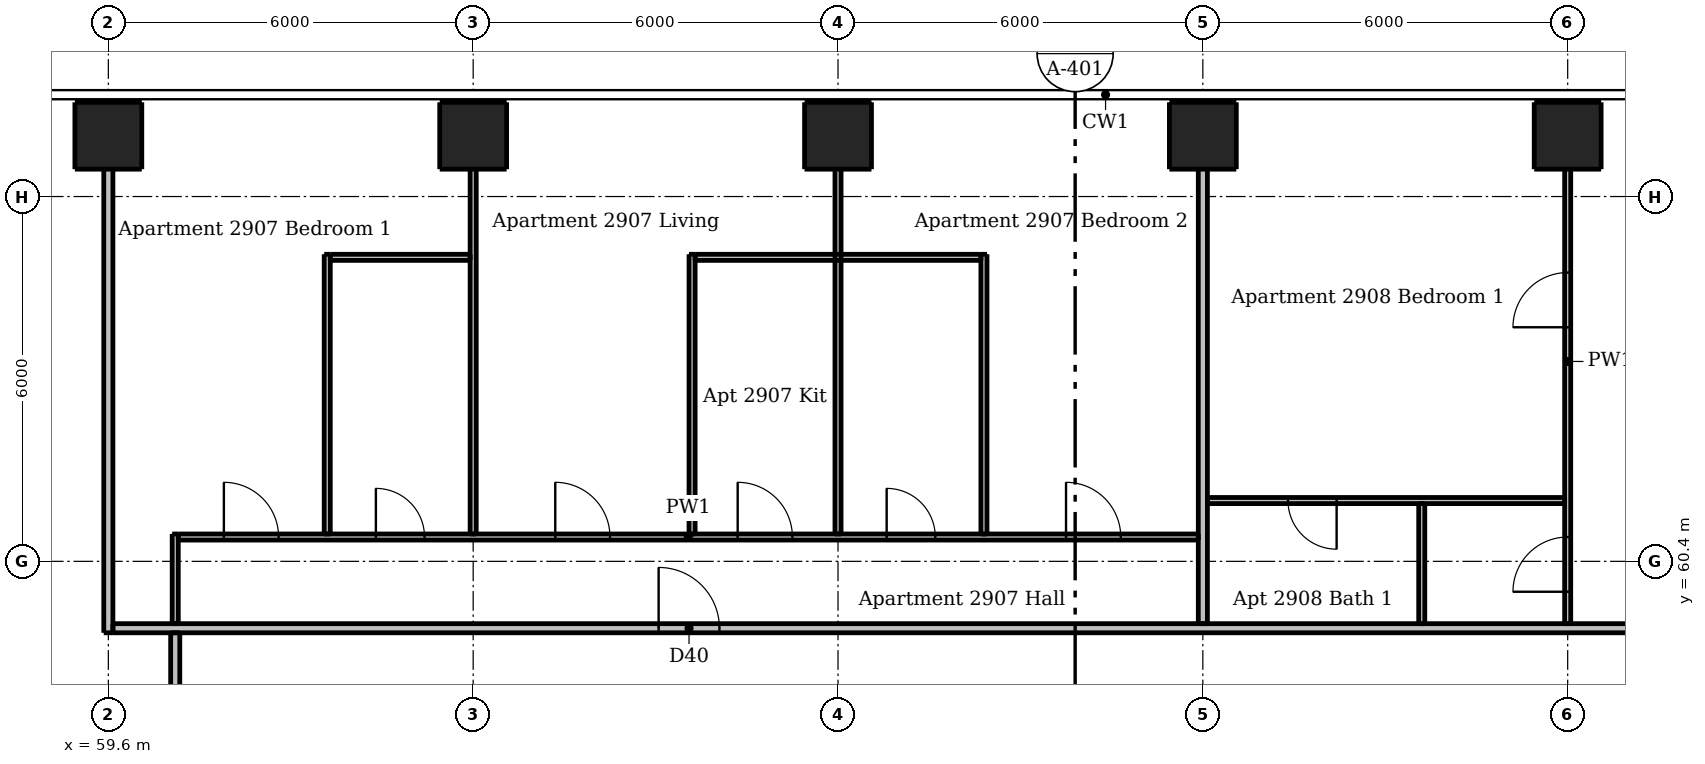
"""IFC4 building model, lengths in metres.
Left out: names, types, materials, properties, quantities, classifications, styles, units other than length and angle.
Written with IfcOpenShell. Run it as: python <this file> out.ifc"""

import sys

from ifc_helpers import new_model, si_unit, direction, frame, frame_2d, origin, origin_2d, place, context, subcontext, project, spatial, rectangle, extrude, element, fill, save


model = new_model("IFC4")
c1 = context("Model", 3, precision=1e-05, world=origin(), true_north=direction((0.0, 1.0)))
c2 = subcontext(c1, "Body", "Model", "MODEL_VIEW")
j1 = project(units=[si_unit("LENGTHUNIT", "METRE"), si_unit("PLANEANGLEUNIT", "RADIAN")], contexts=[c1])
p1 = place(None, origin())
s1 = spatial("IfcSite", under=j1, at=p1, CompositionType="ELEMENT")
p2 = place(p1, origin())
s2 = spatial("IfcBuilding", under=s1, at=p2, CompositionType="ELEMENT")
p3 = place(p2, frame((0.0, 0.0, 108.4)))
s3 = spatial("IfcBuildingStorey", under=s2, at=p3, CompositionType="ELEMENT", Elevation=108.4)
for number, where, z_axis, x_axis in (
    (1, (59.6, 67.4, 0.0), (0.0, 0.0, 1.0), (1.0, 0.0, 0.0)),
    (2, (65.6, 67.4, 0.0), (0.0, 0.0, 1.0), (1.0, 0.0, 0.0)),
    (3, (71.6, 67.4, 0.0), (0.0, 0.0, 1.0), (1.0, 0.0, 0.0)),
    (4, (77.6, 67.4, 0.0), (0.0, 0.0, 1.0), (1.0, 0.0, 0.0)),
    (5, (83.6, 67.4, 0.0), (0.0, 0.0, 1.0), (1.0, 0.0, 0.0)),
):
    element("IfcColumn", number, at=place(p3, frame(where, z_axis=z_axis, x_axis=x_axis)), inside=s3, PredefinedType="COLUMN", context=c2, shape_type="SweptSolid", body=[
        extrude(rectangle(XDim=1.1, YDim=1.1, at=origin_2d()), origin(), (0.0, 0.0, 1.0), 3.05),
    ])
p4 = place(p3, frame((60.7, 59.375, 0.0), z_axis=(0.0, 0.0, 1.0), x_axis=(0.0, 1.0, 0.0)))
e6 = element("IfcWall", 6, at=p4, inside=s3, PredefinedType="PARTITIONING", context=c2, shape_type="SweptSolid", body=[
    extrude(rectangle(XDim=1.475, YDim=0.1, at=frame_2d((0.738, 0.0))), origin(), (0.0, 0.0, 1.0), 3.05),
])
p5 = place(p3, frame((63.2, 60.85, 0.0), z_axis=(0.0, 0.0, 1.0), x_axis=(0.0, 1.0, 0.0)))
e7 = element("IfcWall", 7, at=p5, inside=s3, PredefinedType="PARTITIONING", context=c2, shape_type="SweptSolid", body=[
    extrude(rectangle(XDim=4.6, YDim=0.1, at=frame_2d((2.3, 0.0))), origin(), (0.0, 0.0, 1.0), 3.05),
])
p6 = place(p3, frame((65.6, 60.85, 0.0), z_axis=(0.0, 0.0, 1.0), x_axis=(0.0, 1.0, 0.0)))
e8 = element("IfcWall", 8, at=p6, inside=s3, PredefinedType="PARTITIONING", context=c2, shape_type="SweptSolid", body=[
    extrude(rectangle(XDim=7.15, YDim=0.1, at=frame_2d((3.575, 0.0))), origin(), (0.0, 0.0, 1.0), 2.516),
])
p7 = place(p3, frame((69.2, 60.85, 0.0), z_axis=(0.0, 0.0, 1.0), x_axis=(0.0, 1.0, 0.0)))
e9 = element("IfcWall", 9, at=p7, inside=s3, PredefinedType="PARTITIONING", context=c2, shape_type="SweptSolid", body=[
    extrude(rectangle(XDim=4.6, YDim=0.1, at=frame_2d((2.3, 0.0))), origin(), (0.0, 0.0, 1.0), 3.05),
])
p8 = place(p3, frame((71.6, 60.85, 0.0), z_axis=(0.0, 0.0, 1.0), x_axis=(0.0, 1.0, 0.0)))
e10 = element("IfcWall", 10, at=p8, inside=s3, PredefinedType="PARTITIONING", context=c2, shape_type="SweptSolid", body=[
    extrude(rectangle(XDim=7.15, YDim=0.1, at=frame_2d((3.575, 0.0))), origin(), (0.0, 0.0, 1.0), 2.516),
])
p9 = place(p3, frame((74.0, 60.85, 0.0), z_axis=(0.0, 0.0, 1.0), x_axis=(0.0, 1.0, 0.0)))
e11 = element("IfcWall", 11, at=p9, inside=s3, PredefinedType="PARTITIONING", context=c2, shape_type="SweptSolid", body=[
    extrude(rectangle(XDim=4.6, YDim=0.1, at=frame_2d((2.3, 0.0))), origin(), (0.0, 0.0, 1.0), 3.05),
])
p10 = place(p3, frame((81.2, 59.375, 0.0), z_axis=(0.0, 0.0, 1.0), x_axis=(0.0, 1.0, 0.0)))
e12 = element("IfcWall", 12, at=p10, inside=s3, PredefinedType="PARTITIONING", context=c2, shape_type="SweptSolid", body=[
    extrude(rectangle(XDim=1.975, YDim=0.1, at=frame_2d((0.988, 0.0))), origin(), (0.0, 0.0, 1.0), 3.05),
])
p11 = place(p3, frame((83.6, 59.375, 0.0), z_axis=(0.0, 0.0, 1.0), x_axis=(0.0, 1.0, 0.0)))
e13 = element("IfcWall", 13, at=p11, inside=s3, PredefinedType="PARTITIONING", context=c2, shape_type="SweptSolid", body=[
    extrude(rectangle(XDim=8.625, YDim=0.1, at=frame_2d((4.312, 0.0))), origin(), (0.0, 0.0, 1.0), 2.516),
])
p12 = place(p11, frame((0.525, 0.0, 0.0)))
e14 = element("IfcOpeningElement", 14, at=p12, cuts=e13, PredefinedType="OPENING", context=c2, shape_type="SweptSolid", body=[
    extrude(rectangle(XDim=0.9, YDim=2.1, at=frame_2d((0.45, 1.05))), frame((0.0, 0.06, 0.0), z_axis=(0.0, -1.0, 0.0), x_axis=(1.0, 0.0, 0.0)), (0.0, 0.0, 1.0), 0.12),
])
p13 = place(p11, frame((4.875, 0.0, 0.0)))
e15 = element("IfcOpeningElement", 15, at=p13, cuts=e13, PredefinedType="OPENING", context=c2, shape_type="SweptSolid", body=[
    extrude(rectangle(XDim=0.9, YDim=2.1, at=frame_2d((0.45, 1.05))), frame((0.0, 0.06, 0.0), z_axis=(0.0, -1.0, 0.0), x_axis=(1.0, 0.0, 0.0)), (0.0, 0.0, 1.0), 0.12),
])
p14 = place(p3, frame((63.25, 65.4, 0.0), z_axis=(0.0, 0.0, 1.0), x_axis=(1.0, 0.0, 0.0)))
e16 = element("IfcWall", 16, at=p14, inside=s3, PredefinedType="PARTITIONING", context=c2, shape_type="SweptSolid", body=[
    extrude(rectangle(XDim=2.3, YDim=0.1, at=frame_2d((1.15, 0.0))), origin(), (0.0, 0.0, 1.0), 3.05),
])
p15 = place(p3, frame((69.25, 65.4, 0.0), z_axis=(0.0, 0.0, 1.0), x_axis=(1.0, 0.0, 0.0)))
e17 = element("IfcWall", 17, at=p15, inside=s3, PredefinedType="PARTITIONING", context=c2, shape_type="SweptSolid", body=[
    extrude(rectangle(XDim=4.7, YDim=0.1, at=frame_2d((2.35, 0.0))), origin(), (0.0, 0.0, 1.0), 3.05),
])
p16 = place(p3, frame((83.55, 61.4, 0.0), z_axis=(0.0, 0.0, 1.0), x_axis=(-1.0, 0.0, 0.0)))
e18 = element("IfcWall", 18, at=p16, inside=s3, PredefinedType="PARTITIONING", context=c2, shape_type="SweptSolid", body=[
    extrude(rectangle(XDim=5.875, YDim=0.1, at=frame_2d((2.938, 0.0))), origin(), (0.0, 0.0, 1.0), 3.05),
])
p17 = place(p16, frame((3.75, 0.0, 0.0)))
e19 = element("IfcOpeningElement", 19, at=p17, cuts=e18, PredefinedType="OPENING", context=c2, shape_type="SweptSolid", body=[
    extrude(rectangle(XDim=0.8, YDim=2.1, at=frame_2d((0.4, 1.05))), frame((0.0, 0.06, 0.0), z_axis=(0.0, -1.0, 0.0), x_axis=(1.0, 0.0, 0.0)), (0.0, 0.0, 1.0), 0.12),
])
p18 = place(p3, frame((60.75, 60.8, 0.0), z_axis=(0.0, 0.0, 1.0), x_axis=(1.0, 0.0, 0.0)))
e20 = element("IfcWall", 20, at=p18, inside=s3, PredefinedType="PARTITIONING", context=c2, shape_type="SweptSolid", body=[
    extrude(rectangle(XDim=16.775, YDim=0.1, at=frame_2d((8.387, 0.0))), origin(), (0.0, 0.0, 1.0), 3.05),
])
p19 = place(p18, frame((6.2, 0.0, 0.0)))
e21 = element("IfcOpeningElement", 21, at=p19, cuts=e20, PredefinedType="OPENING", context=c2, shape_type="SweptSolid", body=[
    extrude(rectangle(XDim=0.9, YDim=2.1, at=frame_2d((0.45, 1.05))), frame((0.0, 0.06, 0.0), z_axis=(0.0, -1.0, 0.0), x_axis=(1.0, 0.0, 0.0)), (0.0, 0.0, 1.0), 0.12),
])
p20 = place(p18, frame((9.2, 0.0, 0.0)))
e22 = element("IfcOpeningElement", 22, at=p20, cuts=e20, PredefinedType="OPENING", context=c2, shape_type="SweptSolid", body=[
    extrude(rectangle(XDim=0.9, YDim=2.1, at=frame_2d((0.45, 1.05))), frame((0.0, 0.06, 0.0), z_axis=(0.0, -1.0, 0.0), x_axis=(1.0, 0.0, 0.0)), (0.0, 0.0, 1.0), 0.12),
])
p21 = place(p18, frame((0.75, 0.0, 0.0)))
e23 = element("IfcOpeningElement", 23, at=p21, cuts=e20, PredefinedType="OPENING", context=c2, shape_type="SweptSolid", body=[
    extrude(rectangle(XDim=0.9, YDim=2.1, at=frame_2d((0.45, 1.05))), frame((0.0, 0.06, 0.0), z_axis=(0.0, -1.0, 0.0), x_axis=(1.0, 0.0, 0.0)), (0.0, 0.0, 1.0), 0.12),
])
p22 = place(p18, frame((14.6, 0.0, 0.0)))
e24 = element("IfcOpeningElement", 24, at=p22, cuts=e20, PredefinedType="OPENING", context=c2, shape_type="SweptSolid", body=[
    extrude(rectangle(XDim=0.9, YDim=2.1, at=frame_2d((0.45, 1.05))), frame((0.0, 0.06, 0.0), z_axis=(0.0, -1.0, 0.0), x_axis=(1.0, 0.0, 0.0)), (0.0, 0.0, 1.0), 0.12),
])
p23 = place(p18, frame((3.25, 0.0, 0.0)))
e25 = element("IfcOpeningElement", 25, at=p23, cuts=e20, PredefinedType="OPENING", context=c2, shape_type="SweptSolid", body=[
    extrude(rectangle(XDim=0.8, YDim=2.1, at=frame_2d((0.4, 1.05))), frame((0.0, 0.06, 0.0), z_axis=(0.0, -1.0, 0.0), x_axis=(1.0, 0.0, 0.0)), (0.0, 0.0, 1.0), 0.12),
])
p24 = place(p18, frame((11.65, 0.0, 0.0)))
e26 = element("IfcOpeningElement", 26, at=p24, cuts=e20, PredefinedType="OPENING", context=c2, shape_type="SweptSolid", body=[
    extrude(rectangle(XDim=0.8, YDim=2.1, at=frame_2d((0.4, 1.05))), frame((0.0, 0.06, 0.0), z_axis=(0.0, -1.0, 0.0), x_axis=(1.0, 0.0, 0.0)), (0.0, 0.0, 1.0), 0.12),
])
p25 = place(p3, frame((59.6, 59.225, 0.0), z_axis=(0.0, 0.0, 1.0), x_axis=(0.0, 1.0, 0.0)))
e27 = element("IfcWall", 27, at=p25, inside=s3, PredefinedType="PARTITIONING", context=c2, shape_type="SweptSolid", body=[
    extrude(rectangle(XDim=8.775, YDim=0.15, at=frame_2d((4.387, 0.0))), origin(), (0.0, 0.0, 1.0), 2.51),
])
p26 = place(p3, frame((60.7, 30.325, 0.0), z_axis=(0.0, 0.0, 1.0), x_axis=(0.0, 1.0, 0.0)))
e28 = element("IfcWall", 28, at=p26, inside=s3, PredefinedType="PARTITIONING", context=c2, shape_type="SweptSolid", body=[
    extrude(rectangle(XDim=28.9, YDim=0.15, at=frame_2d((14.45, 0.0))), origin(), (0.0, 0.0, 1.0), 3.05),
])
p27 = place(p26, frame((9.225, 0.0, 0.0)))
e29 = element("IfcOpeningElement", 29, at=p27, cuts=e28, PredefinedType="OPENING", context=c2, shape_type="SweptSolid", body=[
    extrude(rectangle(XDim=1.0, YDim=2.1, at=frame_2d((0.5, 1.05))), frame((0.0, 0.085, 0.0), z_axis=(0.0, -1.0, 0.0), x_axis=(1.0, 0.0, 0.0)), (0.0, 0.0, 1.0), 0.17),
])
p28 = place(p26, frame((26.025, 0.0, 0.0)))
e30 = element("IfcOpeningElement", 30, at=p28, cuts=e28, PredefinedType="OPENING", context=c2, shape_type="SweptSolid", body=[
    extrude(rectangle(XDim=1.0, YDim=2.1, at=frame_2d((0.5, 1.05))), frame((0.0, 0.085, 0.0), z_axis=(0.0, -1.0, 0.0), x_axis=(1.0, 0.0, 0.0)), (0.0, 0.0, 1.0), 0.17),
])
p29 = place(p3, frame((77.6, 59.375, 0.0), z_axis=(0.0, 0.0, 1.0), x_axis=(0.0, 1.0, 0.0)))
e31 = element("IfcWall", 31, at=p29, inside=s3, PredefinedType="PARTITIONING", context=c2, shape_type="SweptSolid", body=[
    extrude(rectangle(XDim=8.625, YDim=0.15, at=frame_2d((4.312, 0.0))), origin(), (0.0, 0.0, 1.0), 2.516),
])
p30 = place(p3, frame((59.675, 59.3, 0.0), z_axis=(0.0, 0.0, 1.0), x_axis=(1.0, 0.0, 0.0)))
e32 = element("IfcWall", 32, at=p30, inside=s3, PredefinedType="PARTITIONING", context=c2, shape_type="SweptSolid", body=[
    extrude(rectangle(XDim=28.55, YDim=0.15, at=frame_2d((14.275, 0.0))), origin(), (0.0, 0.0, 1.0), 3.05),
])
p31 = place(p30, frame((8.975, 0.0, 0.0)))
e33 = element("IfcOpeningElement", 33, at=p31, cuts=e32, PredefinedType="OPENING", context=c2, shape_type="SweptSolid", body=[
    extrude(rectangle(XDim=1.0, YDim=2.1, at=frame_2d((0.5, 1.05))), frame((0.0, 0.085, 0.0), z_axis=(0.0, -1.0, 0.0), x_axis=(1.0, 0.0, 0.0)), (0.0, 0.0, 1.0), 0.17),
])
p32 = place(p30, frame((25.775, 0.0, 0.0)))
e34 = element("IfcOpeningElement", 34, at=p32, cuts=e32, PredefinedType="OPENING", context=c2, shape_type="SweptSolid", body=[
    extrude(rectangle(XDim=1.0, YDim=2.1, at=frame_2d((0.5, 1.05))), frame((0.0, 0.085, 0.0), z_axis=(0.0, -1.0, 0.0), x_axis=(1.0, 0.0, 0.0)), (0.0, 0.0, 1.0), 0.17),
])
p33 = place(p31, origin())
e35 = element("IfcDoor", 35, at=p33, inside=s3, OperationType="SINGLE_SWING_LEFT", PredefinedType="DOOR", context=c2, shape_type="SweptSolid", body=[
    extrude(rectangle(XDim=1.0, YDim=2.1, at=frame_2d((0.5, 1.05))), frame((0.0, 0.025, 0.0), z_axis=(0.0, -1.0, 0.0), x_axis=(1.0, 0.0, 0.0)), (0.0, 0.0, 1.0), 0.05),
])
fill(e33, e35)
p34 = place(p19, origin())
e36 = element("IfcDoor", 36, at=p34, inside=s3, OperationType="SINGLE_SWING_LEFT", PredefinedType="DOOR", context=c2, shape_type="SweptSolid", body=[
    extrude(rectangle(XDim=0.9, YDim=2.1, at=frame_2d((0.45, 1.05))), frame((0.0, 0.025, 0.0), z_axis=(0.0, -1.0, 0.0), x_axis=(1.0, 0.0, 0.0)), (0.0, 0.0, 1.0), 0.05),
])
fill(e21, e36)
p35 = place(p20, origin())
e37 = element("IfcDoor", 37, at=p35, inside=s3, OperationType="SINGLE_SWING_LEFT", PredefinedType="DOOR", context=c2, shape_type="SweptSolid", body=[
    extrude(rectangle(XDim=0.9, YDim=2.1, at=frame_2d((0.45, 1.05))), frame((0.0, 0.025, 0.0), z_axis=(0.0, -1.0, 0.0), x_axis=(1.0, 0.0, 0.0)), (0.0, 0.0, 1.0), 0.05),
])
fill(e22, e37)
p36 = place(p21, origin())
e38 = element("IfcDoor", 38, at=p36, inside=s3, OperationType="SINGLE_SWING_LEFT", PredefinedType="DOOR", context=c2, shape_type="SweptSolid", body=[
    extrude(rectangle(XDim=0.9, YDim=2.1, at=frame_2d((0.45, 1.05))), frame((0.0, 0.025, 0.0), z_axis=(0.0, -1.0, 0.0), x_axis=(1.0, 0.0, 0.0)), (0.0, 0.0, 1.0), 0.05),
])
fill(e23, e38)
p37 = place(p22, origin())
e39 = element("IfcDoor", 39, at=p37, inside=s3, OperationType="SINGLE_SWING_LEFT", PredefinedType="DOOR", context=c2, shape_type="SweptSolid", body=[
    extrude(rectangle(XDim=0.9, YDim=2.1, at=frame_2d((0.45, 1.05))), frame((0.0, 0.025, 0.0), z_axis=(0.0, -1.0, 0.0), x_axis=(1.0, 0.0, 0.0)), (0.0, 0.0, 1.0), 0.05),
])
fill(e24, e39)
p38 = place(p23, origin())
e40 = element("IfcDoor", 40, at=p38, inside=s3, OperationType="SINGLE_SWING_LEFT", PredefinedType="DOOR", context=c2, shape_type="SweptSolid", body=[
    extrude(rectangle(XDim=0.8, YDim=2.1, at=frame_2d((0.4, 1.05))), frame((0.0, 0.025, 0.0), z_axis=(0.0, -1.0, 0.0), x_axis=(1.0, 0.0, 0.0)), (0.0, 0.0, 1.0), 0.05),
])
fill(e25, e40)
p39 = place(p24, origin())
e41 = element("IfcDoor", 41, at=p39, inside=s3, OperationType="SINGLE_SWING_LEFT", PredefinedType="DOOR", context=c2, shape_type="SweptSolid", body=[
    extrude(rectangle(XDim=0.8, YDim=2.1, at=frame_2d((0.4, 1.05))), frame((0.0, 0.025, 0.0), z_axis=(0.0, -1.0, 0.0), x_axis=(1.0, 0.0, 0.0)), (0.0, 0.0, 1.0), 0.05),
])
fill(e26, e41)
p40 = place(p12, origin())
e42 = element("IfcDoor", 42, at=p40, inside=s3, OperationType="SINGLE_SWING_LEFT", PredefinedType="DOOR", context=c2, shape_type="SweptSolid", body=[
    extrude(rectangle(XDim=0.9, YDim=2.1, at=frame_2d((0.45, 1.05))), frame((0.0, 0.025, 0.0), z_axis=(0.0, -1.0, 0.0), x_axis=(1.0, 0.0, 0.0)), (0.0, 0.0, 1.0), 0.05),
])
fill(e14, e42)
p41 = place(p13, origin())
e43 = element("IfcDoor", 43, at=p41, inside=s3, OperationType="SINGLE_SWING_LEFT", PredefinedType="DOOR", context=c2, shape_type="SweptSolid", body=[
    extrude(rectangle(XDim=0.9, YDim=2.1, at=frame_2d((0.45, 1.05))), frame((0.0, 0.025, 0.0), z_axis=(0.0, -1.0, 0.0), x_axis=(1.0, 0.0, 0.0)), (0.0, 0.0, 1.0), 0.05),
])
fill(e15, e43)
p42 = place(p17, origin())
e44 = element("IfcDoor", 44, at=p42, inside=s3, OperationType="SINGLE_SWING_LEFT", PredefinedType="DOOR", context=c2, shape_type="SweptSolid", body=[
    extrude(rectangle(XDim=0.8, YDim=2.1, at=frame_2d((0.4, 1.05))), frame((0.0, 0.025, 0.0), z_axis=(0.0, -1.0, 0.0), x_axis=(1.0, 0.0, 0.0)), (0.0, 0.0, 1.0), 0.05),
])
fill(e19, e44)
save(model, sys.argv[1])
